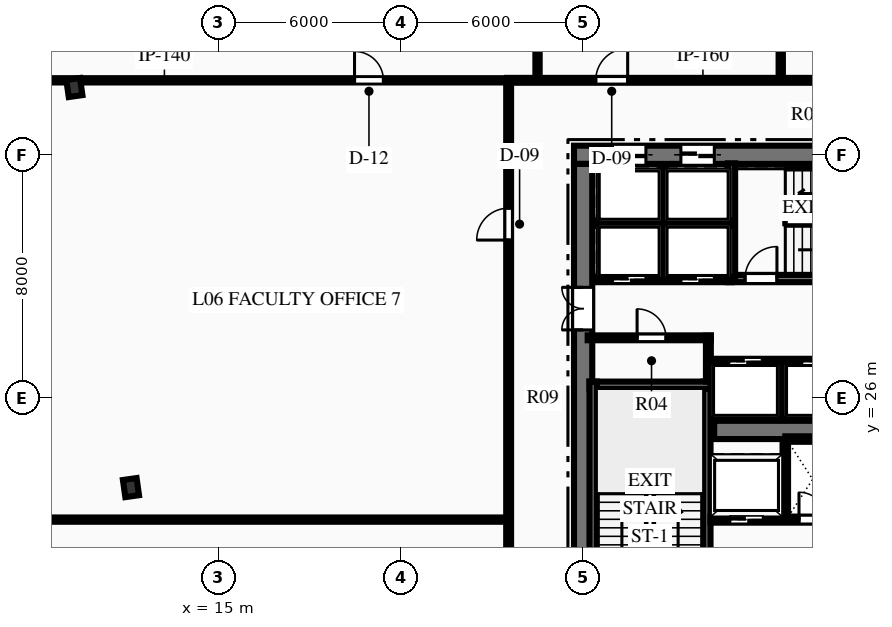
"""IFC4 building model, lengths in metres.
Left out: names, types, materials, properties, quantities, classifications, styles, units other than length and angle.
Written with IfcOpenShell. Run it as: python <this file> out.ifc"""

import sys

from ifc_helpers import new_model, si_unit, direction, frame, frame_2d, origin, origin_2d, place, context, subcontext, project, spatial, rectangle, i_section, extrude, element, fill, save


model = new_model("IFC4")
c1 = context("Model", 3, precision=1e-05, world=origin(), true_north=direction((0.0, 1.0)))
c2 = subcontext(c1, "Body", "Model", "MODEL_VIEW")
j1 = project(units=[si_unit("LENGTHUNIT", "METRE"), si_unit("PLANEANGLEUNIT", "RADIAN")], contexts=[c1])
p1 = place(None, origin())
s1 = spatial("IfcSite", under=j1, at=p1, CompositionType="ELEMENT")
p2 = place(p1, origin())
s2 = spatial("IfcBuilding", under=s1, at=p2, CompositionType="ELEMENT")
p3 = place(p2, frame((0.0, 0.0, 32.7)))
s3 = spatial("IfcBuildingStorey", under=s2, at=p3, CompositionType="ELEMENT", Elevation=32.7)
p4 = place(p3, frame((26.7, 34.0, 0.0), z_axis=(0.0, 0.0, 1.0), x_axis=(1.0, 0.0, 0.0)))
e1 = element("IfcWall", 1, at=p4, inside=s3, PredefinedType="SHEAR", context=c2, shape_type="SweptSolid", body=[
    extrude(rectangle(XDim=18.6, YDim=0.6, at=frame_2d((9.3, 0.0))), origin(), (0.0, 0.0, 1.0), 3.75),
])
p5 = place(p4, frame((1.265, 0.0, 0.0)))
e2 = element("IfcOpeningElement", 2, at=p5, cuts=e1, PredefinedType="OPENING", context=c2, shape_type="SweptSolid", body=[
    extrude(rectangle(XDim=1.1, YDim=2.15, at=frame_2d((0.55, 1.075))), frame((0.0, 0.31, 0.0), z_axis=(0.0, -1.0, 0.0), x_axis=(1.0, 0.0, 0.0)), (0.0, 0.0, 1.0), 0.62),
])
p6 = place(p4, frame((3.515, 0.0, 0.0)))
e3 = element("IfcOpeningElement", 3, at=p6, cuts=e1, PredefinedType="OPENING", context=c2, shape_type="SweptSolid", body=[
    extrude(rectangle(XDim=1.1, YDim=2.15, at=frame_2d((0.55, 1.075))), frame((0.0, 0.31, 0.0), z_axis=(0.0, -1.0, 0.0), x_axis=(1.0, 0.0, 0.0)), (0.0, 0.0, 1.0), 0.62),
])
p7 = place(p4, frame((13.985, 0.0, 0.0)))
e4 = element("IfcOpeningElement", 4, at=p7, cuts=e1, PredefinedType="OPENING", context=c2, shape_type="SweptSolid", body=[
    extrude(rectangle(XDim=1.1, YDim=2.15, at=frame_2d((0.55, 1.075))), frame((0.0, 0.31, 0.0), z_axis=(0.0, -1.0, 0.0), x_axis=(1.0, 0.0, 0.0)), (0.0, 0.0, 1.0), 0.62),
])
p8 = place(p4, frame((16.235, 0.0, 0.0)))
e5 = element("IfcOpeningElement", 5, at=p8, cuts=e1, PredefinedType="OPENING", context=c2, shape_type="SweptSolid", body=[
    extrude(rectangle(XDim=1.1, YDim=2.15, at=frame_2d((0.55, 1.075))), frame((0.0, 0.31, 0.0), z_axis=(0.0, -1.0, 0.0), x_axis=(1.0, 0.0, 0.0)), (0.0, 0.0, 1.0), 0.62),
])
p9 = place(p3, frame((27.0, 18.3, 0.0), z_axis=(0.0, 0.0, 1.0), x_axis=(0.0, 1.0, 0.0)))
e6 = element("IfcWall", 6, at=p9, inside=s3, PredefinedType="SHEAR", context=c2, shape_type="SweptSolid", body=[
    extrude(rectangle(XDim=15.4, YDim=0.6, at=frame_2d((7.7, 0.0))), origin(), (0.0, 0.0, 1.0), 3.75),
])
p10 = place(p9, frame((9.94, 0.0, 0.0)))
e7 = element("IfcOpeningElement", 7, at=p10, cuts=e6, PredefinedType="OPENING", context=c2, shape_type="SweptSolid", body=[
    extrude(rectangle(XDim=1.4, YDim=2.2, at=frame_2d((0.7, 1.1))), frame((0.0, 0.31, 0.0), z_axis=(0.0, -1.0, 0.0), x_axis=(1.0, 0.0, 0.0)), (0.0, 0.0, 1.0), 0.62),
])
p11 = place(p3, frame((31.31, 24.95, 0.0), z_axis=(0.0, 0.0, 1.0), x_axis=(1.0, 0.0, 0.0)))
e8 = element("IfcWall", 8, at=p11, inside=s3, PredefinedType="SHEAR", context=c2, shape_type="SweptSolid", body=[
    extrude(rectangle(XDim=9.38, YDim=0.6, at=frame_2d((4.69, 0.0))), origin(), (0.0, 0.0, 1.0), 3.75),
])
p12 = place(p3, frame((31.07, 18.28, 0.0), z_axis=(0.0, 0.0, 1.0), x_axis=(0.0, 1.0, 0.0)))
e9 = element("IfcWall", 9, at=p12, inside=s3, PredefinedType="SHEAR", context=c2, shape_type="SweptSolid", body=[
    extrude(rectangle(XDim=8.26, YDim=0.24, at=frame_2d((4.13, 0.0))), origin(), (0.0, 0.0, 1.0), 3.75),
])
p13 = place(p12, frame((0.365, 0.0, 0.0)))
e10 = element("IfcOpeningElement", 10, at=p13, cuts=e9, PredefinedType="OPENING", context=c2, shape_type="SweptSolid", body=[
    extrude(rectangle(XDim=1.05, YDim=2.15, at=frame_2d((0.525, 1.075))), frame((0.0, 0.13, 0.0), z_axis=(0.0, -1.0, 0.0), x_axis=(1.0, 0.0, 0.0)), (0.0, 0.0, 1.0), 0.26),
])
p14 = place(p3, frame((27.21, 26.42, 0.0), z_axis=(0.0, 0.0, 1.0), x_axis=(1.0, 0.0, 0.0)))
e11 = element("IfcWall", 11, at=p14, inside=s3, PredefinedType="SHEAR", context=c2, shape_type="SweptSolid", body=[
    extrude(rectangle(XDim=3.98, YDim=0.24, at=frame_2d((1.99, 0.0))), origin(), (0.0, 0.0, 1.0), 3.75),
])
p15 = place(p3, frame((27.33, 18.28, 0.0), z_axis=(0.0, 0.0, 1.0), x_axis=(0.0, 1.0, 0.0)))
e12 = element("IfcWall", 12, at=p15, inside=s3, PredefinedType="SHEAR", context=c2, shape_type="SweptSolid", body=[
    extrude(rectangle(XDim=8.26, YDim=0.24, at=frame_2d((4.13, 0.0))), origin(), (0.0, 0.0, 1.0), 3.75),
])
p16 = place(p3, frame((31.76, 29.93, 0.0), z_axis=(0.0, 0.0, 1.0), x_axis=(1.0, 0.0, 0.0)))
e13 = element("IfcWall", 13, at=p16, inside=s3, PredefinedType="SHEAR", context=c2, shape_type="SweptSolid", body=[
    extrude(rectangle(XDim=8.38, YDim=0.24, at=frame_2d((4.19, 0.0))), origin(), (0.0, 0.0, 1.0), 3.75),
])
p17 = place(p16, frame((0.565, 0.0, 0.0)))
e14 = element("IfcOpeningElement", 14, at=p17, cuts=e13, PredefinedType="OPENING", context=c2, shape_type="SweptSolid", body=[
    extrude(rectangle(XDim=1.05, YDim=2.15, at=frame_2d((0.525, 1.075))), frame((0.0, 0.13, 0.0), z_axis=(0.0, -1.0, 0.0), x_axis=(1.0, 0.0, 0.0)), (0.0, 0.0, 1.0), 0.26),
])
p18 = place(p3, frame((31.88, 29.93, 0.0), z_axis=(0.0, 0.0, 1.0), x_axis=(0.0, 1.0, 0.0)))
e15 = element("IfcWall", 15, at=p18, inside=s3, PredefinedType="SHEAR", context=c2, shape_type="SweptSolid", body=[
    extrude(rectangle(XDim=3.79, YDim=0.24, at=frame_2d((1.895, 0.0))), origin(), (0.0, 0.0, 1.0), 3.75),
])
for number, where, z_axis, x_axis in (
    (16, (10.266, 36.213, 0.0), (0.0, 0.0, 1.0), (0.99, 0.14, 0.0)),
    (17, (12.127, 23.053, 0.0), (0.0, 0.0, 1.0), (0.99, 0.14, 0.0)),
):
    element("IfcColumn", number, at=place(p3, frame(where, z_axis=z_axis, x_axis=x_axis)), inside=s3, PredefinedType="COLUMN", context=c2, shape_type="SweptSolid", body=[
        extrude(i_section(OverallWidth=0.454, OverallDepth=0.569, WebThickness=0.078, FlangeThickness=0.125, at=origin_2d()), origin(), (0.0, 0.0, 1.0), 3.75),
    ])
p19 = place(p3, frame((31.19, 22.0, 0.0), z_axis=(0.0, 0.0, 1.0), x_axis=(1.0, 0.0, 0.0)))
e18 = element("IfcWall", 18, at=p19, inside=s3, PredefinedType="PARTITIONING", context=c2, shape_type="SweptSolid", body=[
    extrude(rectangle(XDim=4.69, YDim=0.2, at=frame_2d((2.345, 0.0))), origin(), (0.0, 0.0, 1.0), 3.44),
])
p20 = place(p19, frame((2.91, 0.0, 0.0)))
e19 = element("IfcOpeningElement", 19, at=p20, cuts=e18, PredefinedType="OPENING", context=c2, shape_type="SweptSolid", body=[
    extrude(rectangle(XDim=0.9, YDim=2.15, at=frame_2d((0.45, 1.075))), frame((0.0, 0.11, 0.0), z_axis=(0.0, -1.0, 0.0), x_axis=(1.0, 0.0, 0.0)), (0.0, 0.0, 1.0), 0.22),
])
p21 = place(p19, frame((0.635, 0.0, 0.0)))
e20 = element("IfcOpeningElement", 20, at=p21, cuts=e18, PredefinedType="OPENING", context=c2, shape_type="SweptSolid", body=[
    extrude(rectangle(XDim=1.1, YDim=2.15, at=frame_2d((0.55, 1.075))), frame((0.0, 0.11, 0.0), z_axis=(0.0, -1.0, 0.0), x_axis=(1.0, 0.0, 0.0)), (0.0, 0.0, 1.0), 0.22),
])
p22 = place(p3, frame((33.65, 22.05, 0.0), z_axis=(0.0, 0.0, 1.0), x_axis=(0.0, 1.0, 0.0)))
e21 = element("IfcWall", 21, at=p22, inside=s3, PredefinedType="PARTITIONING", context=c2, shape_type="SweptSolid", body=[
    extrude(rectangle(XDim=2.6, YDim=0.18, at=frame_2d((1.3, 0.0))), origin(), (0.0, 0.0, 1.0), 3.44),
])
p23 = place(p3, frame((33.65, 24.65, 0.0), z_axis=(0.0, 0.0, 1.0), x_axis=(1.0, 0.0, 0.0)))
e22 = element("IfcWall", 22, at=p23, inside=s3, PredefinedType="PARTITIONING", context=c2, shape_type="SweptSolid", body=[
    extrude(rectangle(XDim=1.8, YDim=0.18, at=frame_2d((0.9, 0.0))), origin(), (0.0, 0.0, 1.0), 3.44),
])
p24 = place(p3, frame((27.15, 27.98, 0.0), z_axis=(0.0, 0.0, 1.0), x_axis=(1.0, 0.0, 0.0)))
e23 = element("IfcWall", 23, at=p24, inside=s3, PredefinedType="PARTITIONING", context=c2, shape_type="SweptSolid", body=[
    extrude(rectangle(XDim=4.05, YDim=0.16, at=frame_2d((2.025, 0.0))), origin(), (0.0, 0.0, 1.0), 3.44),
])
p25 = place(p24, frame((1.625, 0.0, 0.0)))
e24 = element("IfcOpeningElement", 24, at=p25, cuts=e23, PredefinedType="OPENING", context=c2, shape_type="SweptSolid", body=[
    extrude(rectangle(XDim=0.95, YDim=2.15, at=frame_2d((0.475, 1.075))), frame((0.0, 0.09, 0.0), z_axis=(0.0, -1.0, 0.0), x_axis=(1.0, 0.0, 0.0)), (0.0, 0.0, 1.0), 0.18),
])
p26 = place(p3, frame((31.12, 26.54, 0.0), z_axis=(0.0, 0.0, 1.0), x_axis=(0.0, 1.0, 0.0)))
e25 = element("IfcWall", 25, at=p26, inside=s3, PredefinedType="PARTITIONING", context=c2, shape_type="SweptSolid", body=[
    extrude(rectangle(XDim=1.51, YDim=0.16, at=frame_2d((0.755, 0.0))), origin(), (0.0, 0.0, 1.0), 3.44),
])
p27 = place(p3, frame((27.45, 29.9, 0.0), z_axis=(0.0, 0.0, 1.0), x_axis=(1.0, 0.0, 0.0)))
e26 = element("IfcWall", 26, at=p27, inside=s3, PredefinedType="PARTITIONING", context=c2, shape_type="SweptSolid", body=[
    extrude(rectangle(XDim=4.43, YDim=0.18, at=frame_2d((2.215, 0.0))), origin(), (0.0, 0.0, 1.0), 3.44),
])
p28 = place(p27, frame((0.515, 0.0, 0.0)))
e27 = element("IfcOpeningElement", 27, at=p28, cuts=e26, PredefinedType="OPENING", context=c2, shape_type="SweptSolid", body=[
    extrude(rectangle(XDim=1.1, YDim=2.15, at=frame_2d((0.55, 1.075))), frame((0.0, 0.1, 0.0), z_axis=(0.0, -1.0, 0.0), x_axis=(1.0, 0.0, 0.0)), (0.0, 0.0, 1.0), 0.2),
])
p29 = place(p27, frame((2.765, 0.0, 0.0)))
e28 = element("IfcOpeningElement", 28, at=p29, cuts=e26, PredefinedType="OPENING", context=c2, shape_type="SweptSolid", body=[
    extrude(rectangle(XDim=1.1, YDim=2.15, at=frame_2d((0.55, 1.075))), frame((0.0, 0.1, 0.0), z_axis=(0.0, -1.0, 0.0), x_axis=(1.0, 0.0, 0.0)), (0.0, 0.0, 1.0), 0.2),
])
p30 = place(p3, frame((27.45, 31.75, 0.0), z_axis=(0.0, 0.0, 1.0), x_axis=(1.0, 0.0, 0.0)))
e29 = element("IfcWall", 29, at=p30, inside=s3, PredefinedType="PARTITIONING", context=c2, shape_type="SweptSolid", body=[
    extrude(rectangle(XDim=4.43, YDim=0.18, at=frame_2d((2.215, 0.0))), origin(), (0.0, 0.0, 1.0), 3.44),
])
p31 = place(p3, frame((29.63, 29.9, 0.0), z_axis=(0.0, 0.0, 1.0), x_axis=(0.0, 1.0, 0.0)))
e30 = element("IfcWall", 30, at=p31, inside=s3, PredefinedType="PARTITIONING", context=c2, shape_type="SweptSolid", body=[
    extrude(rectangle(XDim=3.75, YDim=0.18, at=frame_2d((1.875, 0.0))), origin(), (0.0, 0.0, 1.0), 3.44),
])
p32 = place(p3, frame((31.2, 27.2, 0.0), z_axis=(0.0, 0.0, 1.0), x_axis=(1.0, 0.0, 0.0)))
e31 = element("IfcWall", 31, at=p32, inside=s3, PredefinedType="PARTITIONING", context=c2, shape_type="SweptSolid", body=[
    extrude(rectangle(XDim=9.6, YDim=0.18, at=frame_2d((4.8, 0.0))), origin(), (0.0, 0.0, 1.0), 3.44),
])
p33 = place(p32, frame((0.59, 0.0, 0.0)))
e32 = element("IfcOpeningElement", 32, at=p33, cuts=e31, PredefinedType="OPENING", context=c2, shape_type="SweptSolid", body=[
    extrude(rectangle(XDim=1.1, YDim=2.15, at=frame_2d((0.55, 1.075))), frame((0.0, 0.1, 0.0), z_axis=(0.0, -1.0, 0.0), x_axis=(1.0, 0.0, 0.0)), (0.0, 0.0, 1.0), 0.2),
])
p34 = place(p32, frame((2.99, 0.0, 0.0)))
e33 = element("IfcOpeningElement", 33, at=p34, cuts=e31, PredefinedType="OPENING", context=c2, shape_type="SweptSolid", body=[
    extrude(rectangle(XDim=1.1, YDim=2.15, at=frame_2d((0.55, 1.075))), frame((0.0, 0.1, 0.0), z_axis=(0.0, -1.0, 0.0), x_axis=(1.0, 0.0, 0.0)), (0.0, 0.0, 1.0), 0.2),
])
p35 = place(p32, frame((5.51, 0.0, 0.0)))
e34 = element("IfcOpeningElement", 34, at=p35, cuts=e31, PredefinedType="OPENING", context=c2, shape_type="SweptSolid", body=[
    extrude(rectangle(XDim=1.1, YDim=2.15, at=frame_2d((0.55, 1.075))), frame((0.0, 0.1, 0.0), z_axis=(0.0, -1.0, 0.0), x_axis=(1.0, 0.0, 0.0)), (0.0, 0.0, 1.0), 0.2),
])
p36 = place(p32, frame((7.91, 0.0, 0.0)))
e35 = element("IfcOpeningElement", 35, at=p36, cuts=e31, PredefinedType="OPENING", context=c2, shape_type="SweptSolid", body=[
    extrude(rectangle(XDim=1.1, YDim=2.15, at=frame_2d((0.55, 1.075))), frame((0.0, 0.1, 0.0), z_axis=(0.0, -1.0, 0.0), x_axis=(1.0, 0.0, 0.0)), (0.0, 0.0, 1.0), 0.2),
])
p37 = place(p3, frame((33.54, 25.3, 0.0), z_axis=(0.0, 0.0, 1.0), x_axis=(0.0, 1.0, 0.0)))
e36 = element("IfcWall", 36, at=p37, inside=s3, PredefinedType="PARTITIONING", context=c2, shape_type="SweptSolid", body=[
    extrude(rectangle(XDim=1.9, YDim=0.18, at=frame_2d((0.95, 0.0))), origin(), (0.0, 0.0, 1.0), 3.44),
])
p38 = place(p3, frame((24.5, 36.45, 0.0), z_axis=(0.0, 0.0, 1.0), x_axis=(1.0, 0.0, 0.0)))
e37 = element("IfcWall", 37, at=p38, inside=s3, PredefinedType="PARTITIONING", context=c2, shape_type="SweptSolid", body=[
    extrude(rectangle(XDim=23.0, YDim=0.16, at=frame_2d((11.5, 0.0))), origin(), (0.0, 0.0, 1.0), 3.44),
])
p39 = place(p38, frame((13.75, 0.0, 0.0)))
e38 = element("IfcOpeningElement", 38, at=p39, cuts=e37, PredefinedType="OPENING", context=c2, shape_type="SweptSolid", body=[
    extrude(rectangle(XDim=0.9, YDim=2.15, at=frame_2d((0.45, 1.075))), frame((0.0, 0.09, 0.0), z_axis=(0.0, -1.0, 0.0), x_axis=(1.0, 0.0, 0.0)), (0.0, 0.0, 1.0), 0.18),
])
p40 = place(p38, frame((16.05, 0.0, 0.0)))
e39 = element("IfcOpeningElement", 39, at=p40, cuts=e37, PredefinedType="OPENING", context=c2, shape_type="SweptSolid", body=[
    extrude(rectangle(XDim=0.9, YDim=2.15, at=frame_2d((0.45, 1.075))), frame((0.0, 0.09, 0.0), z_axis=(0.0, -1.0, 0.0), x_axis=(1.0, 0.0, 0.0)), (0.0, 0.0, 1.0), 0.18),
])
p41 = place(p38, frame((18.3, 0.0, 0.0)))
e40 = element("IfcOpeningElement", 40, at=p41, cuts=e37, PredefinedType="OPENING", context=c2, shape_type="SweptSolid", body=[
    extrude(rectangle(XDim=1.0, YDim=2.15, at=frame_2d((0.5, 1.075))), frame((0.0, 0.09, 0.0), z_axis=(0.0, -1.0, 0.0), x_axis=(1.0, 0.0, 0.0)), (0.0, 0.0, 1.0), 0.18),
])
p42 = place(p38, frame((2.915, 0.0, 0.0)))
e41 = element("IfcOpeningElement", 41, at=p42, cuts=e37, PredefinedType="OPENING", context=c2, shape_type="SweptSolid", body=[
    extrude(rectangle(XDim=1.05, YDim=2.15, at=frame_2d((0.525, 1.075))), frame((0.0, 0.09, 0.0), z_axis=(0.0, -1.0, 0.0), x_axis=(1.0, 0.0, 0.0)), (0.0, 0.0, 1.0), 0.18),
])
p43 = place(p38, frame((11.335, 0.0, 0.0)))
e42 = element("IfcOpeningElement", 42, at=p43, cuts=e37, PredefinedType="OPENING", context=c2, shape_type="SweptSolid", body=[
    extrude(rectangle(XDim=1.05, YDim=2.15, at=frame_2d((0.525, 1.075))), frame((0.0, 0.09, 0.0), z_axis=(0.0, -1.0, 0.0), x_axis=(1.0, 0.0, 0.0)), (0.0, 0.0, 1.0), 0.18),
])
p44 = place(p3, frame((24.55, 15.55, 0.0), z_axis=(0.0, 0.0, 1.0), x_axis=(0.0, 1.0, 0.0)))
e43 = element("IfcWall", 43, at=p44, inside=s3, PredefinedType="PARTITIONING", context=c2, shape_type="SweptSolid", body=[
    extrude(rectangle(XDim=20.9, YDim=0.16, at=frame_2d((10.45, 0.0))), origin(), (0.0, 0.0, 1.0), 3.44),
])
p45 = place(p44, frame((2.052, 0.0, 0.0)))
e44 = element("IfcOpeningElement", 44, at=p45, cuts=e43, PredefinedType="OPENING", context=c2, shape_type="SweptSolid", body=[
    extrude(rectangle(XDim=1.05, YDim=2.15, at=frame_2d((0.525, 1.075))), frame((0.0, 0.09, 0.0), z_axis=(0.0, -1.0, 0.0), x_axis=(1.0, 0.0, 0.0)), (0.0, 0.0, 1.0), 0.18),
])
p46 = place(p44, frame((15.645, 0.0, 0.0)))
e45 = element("IfcOpeningElement", 45, at=p46, cuts=e43, PredefinedType="OPENING", context=c2, shape_type="SweptSolid", body=[
    extrude(rectangle(XDim=1.05, YDim=2.15, at=frame_2d((0.525, 1.075))), frame((0.0, 0.09, 0.0), z_axis=(0.0, -1.0, 0.0), x_axis=(1.0, 0.0, 0.0)), (0.0, 0.0, 1.0), 0.18),
])
p47 = place(p3, frame((8.825, 36.45, 0.0), z_axis=(0.0, 0.0, 1.0), x_axis=(1.0, 0.0, 0.0)))
e46 = element("IfcWall", 46, at=p47, inside=s3, PredefinedType="PARTITIONING", context=c2, shape_type="SweptSolid", body=[
    extrude(rectangle(XDim=15.725, YDim=0.14, at=frame_2d((7.863, 0.0))), origin(), (0.0, 0.0, 1.0), 2.739),
])
p48 = place(p47, frame((10.656, 0.0, 0.0)))
e47 = element("IfcOpeningElement", 47, at=p48, cuts=e46, PredefinedType="OPENING", context=c2, shape_type="SweptSolid", body=[
    extrude(rectangle(XDim=0.95, YDim=2.15, at=frame_2d((0.475, 1.075))), frame((0.0, 0.08, 0.0), z_axis=(0.0, -1.0, 0.0), x_axis=(1.0, 0.0, 0.0)), (0.0, 0.0, 1.0), 0.16),
])
p49 = place(p3, frame((25.5, 36.45, 0.0), z_axis=(0.0, 0.0, 1.0), x_axis=(0.0, 1.0, 0.0)))
e48 = element("IfcWall", 48, at=p49, inside=s3, PredefinedType="PARTITIONING", context=c2, shape_type="SweptSolid", body=[
    extrude(rectangle(XDim=15.304, YDim=0.14, at=frame_2d((7.652, 0.0))), origin(), (0.0, 0.0, 1.0), 3.44),
])
p50 = place(p3, frame((33.5, 36.45, 0.0), z_axis=(0.0, 0.0, 1.0), x_axis=(0.0, 1.0, 0.0)))
e49 = element("IfcWall", 49, at=p50, inside=s3, PredefinedType="PARTITIONING", context=c2, shape_type="SweptSolid", body=[
    extrude(rectangle(XDim=15.465, YDim=0.14, at=frame_2d((7.732, 0.0))), origin(), (0.0, 0.0, 1.0), 3.44),
])
p51 = place(p3, frame((9.115, 22.0, 0.0), z_axis=(0.0, 0.0, 1.0), x_axis=(1.0, 0.0, 0.0)))
e50 = element("IfcWall", 50, at=p51, inside=s3, PredefinedType="PARTITIONING", context=c2, shape_type="SweptSolid", body=[
    extrude(rectangle(XDim=15.435, YDim=0.14, at=frame_2d((7.718, 0.0))), origin(), (0.0, 0.0, 1.0), 3.44),
])
p52 = place(p25, origin())
e51 = element("IfcDoor", 51, at=p52, inside=s3, OperationType="SINGLE_SWING_LEFT", PredefinedType="DOOR", context=c2, shape_type="SweptSolid", body=[
    extrude(rectangle(XDim=0.95, YDim=2.15, at=frame_2d((0.475, 1.075))), frame((0.0, 0.025, 0.0), z_axis=(0.0, -1.0, 0.0), x_axis=(1.0, 0.0, 0.0)), (0.0, 0.0, 1.0), 0.05),
])
fill(e24, e51)
p53 = place(p17, origin())
e52 = element("IfcDoor", 52, at=p53, inside=s3, OperationType="SINGLE_SWING_RIGHT", PredefinedType="DOOR", context=c2, shape_type="SweptSolid", body=[
    extrude(rectangle(XDim=1.05, YDim=2.15, at=frame_2d((0.525, 1.075))), frame((0.0, 0.025, 0.0), z_axis=(0.0, -1.0, 0.0), x_axis=(1.0, 0.0, 0.0)), (0.0, 0.0, 1.0), 0.05),
])
fill(e14, e52)
p54 = place(p20, origin())
e53 = element("IfcDoor", 53, at=p54, inside=s3, OperationType="SINGLE_SWING_LEFT", PredefinedType="DOOR", context=c2, shape_type="SweptSolid", body=[
    extrude(rectangle(XDim=0.9, YDim=2.15, at=frame_2d((0.45, 1.075))), frame((0.0, 0.025, 0.0), z_axis=(0.0, -1.0, 0.0), x_axis=(1.0, 0.0, 0.0)), (0.0, 0.0, 1.0), 0.05),
])
fill(e19, e53)
p55 = place(p10, origin())
e54 = element("IfcDoor", 54, at=p55, inside=s3, OperationType="DOUBLE_DOOR_SINGLE_SWING", PredefinedType="DOOR", context=c2, shape_type="SweptSolid", body=[
    extrude(rectangle(XDim=1.4, YDim=2.2, at=frame_2d((0.7, 1.1))), frame((0.0, 0.025, 0.0), z_axis=(0.0, -1.0, 0.0), x_axis=(1.0, 0.0, 0.0)), (0.0, 0.0, 1.0), 0.05),
])
fill(e7, e54)
p56 = place(p48, origin())
e55 = element("IfcDoor", 55, at=p56, inside=s3, OperationType="SINGLE_SWING_LEFT", PredefinedType="DOOR", context=c2, shape_type="SweptSolid", body=[
    extrude(rectangle(XDim=0.95, YDim=2.15, at=frame_2d((0.475, 1.075))), frame((0.0, 0.025, 0.0), z_axis=(0.0, -1.0, 0.0), x_axis=(1.0, 0.0, 0.0)), (0.0, 0.0, 1.0), 0.05),
])
fill(e47, e55)
p57 = place(p42, origin())
e56 = element("IfcDoor", 56, at=p57, inside=s3, OperationType="SINGLE_SWING_RIGHT", PredefinedType="DOOR", context=c2, shape_type="SweptSolid", body=[
    extrude(rectangle(XDim=1.05, YDim=2.15, at=frame_2d((0.525, 1.075))), frame((0.0, 0.025, 0.0), z_axis=(0.0, -1.0, 0.0), x_axis=(1.0, 0.0, 0.0)), (0.0, 0.0, 1.0), 0.05),
])
fill(e41, e56)
p58 = place(p46, origin())
e57 = element("IfcDoor", 57, at=p58, inside=s3, OperationType="SINGLE_SWING_LEFT", PredefinedType="DOOR", context=c2, shape_type="SweptSolid", body=[
    extrude(rectangle(XDim=1.05, YDim=2.15, at=frame_2d((0.525, 1.075))), frame((0.0, 0.025, 0.0), z_axis=(0.0, -1.0, 0.0), x_axis=(1.0, 0.0, 0.0)), (0.0, 0.0, 1.0), 0.05),
])
fill(e45, e57)
p59 = place(p28, origin())
e58 = element("IfcDoor", 58, at=p59, inside=s3, OperationType="SLIDING_TO_LEFT", PredefinedType="DOOR", context=c2, shape_type="SweptSolid", body=[
    extrude(rectangle(XDim=1.1, YDim=2.15, at=frame_2d((0.55, 1.075))), frame((0.0, 0.025, 0.0), z_axis=(0.0, -1.0, 0.0), x_axis=(1.0, 0.0, 0.0)), (0.0, 0.0, 1.0), 0.05),
])
fill(e27, e58)
p60 = place(p29, origin())
e59 = element("IfcDoor", 59, at=p60, inside=s3, OperationType="SLIDING_TO_LEFT", PredefinedType="DOOR", context=c2, shape_type="SweptSolid", body=[
    extrude(rectangle(XDim=1.1, YDim=2.15, at=frame_2d((0.55, 1.075))), frame((0.0, 0.025, 0.0), z_axis=(0.0, -1.0, 0.0), x_axis=(1.0, 0.0, 0.0)), (0.0, 0.0, 1.0), 0.05),
])
fill(e28, e59)
p61 = place(p5, origin())
e60 = element("IfcDoor", 60, at=p61, inside=s3, OperationType="SLIDING_TO_LEFT", PredefinedType="DOOR", context=c2, shape_type="SweptSolid", body=[
    extrude(rectangle(XDim=1.1, YDim=2.15, at=frame_2d((0.55, 1.075))), frame((0.0, 0.025, 0.0), z_axis=(0.0, -1.0, 0.0), x_axis=(1.0, 0.0, 0.0)), (0.0, 0.0, 1.0), 0.05),
])
fill(e2, e60)
p62 = place(p6, origin())
e61 = element("IfcDoor", 61, at=p62, inside=s3, OperationType="SLIDING_TO_LEFT", PredefinedType="DOOR", context=c2, shape_type="SweptSolid", body=[
    extrude(rectangle(XDim=1.1, YDim=2.15, at=frame_2d((0.55, 1.075))), frame((0.0, 0.025, 0.0), z_axis=(0.0, -1.0, 0.0), x_axis=(1.0, 0.0, 0.0)), (0.0, 0.0, 1.0), 0.05),
])
fill(e3, e61)
p63 = place(p33, origin())
e62 = element("IfcDoor", 62, at=p63, inside=s3, OperationType="SLIDING_TO_LEFT", PredefinedType="DOOR", context=c2, shape_type="SweptSolid", body=[
    extrude(rectangle(XDim=1.1, YDim=2.15, at=frame_2d((0.55, 1.075))), frame((0.0, 0.025, 0.0), z_axis=(0.0, -1.0, 0.0), x_axis=(1.0, 0.0, 0.0)), (0.0, 0.0, 1.0), 0.05),
])
fill(e32, e62)
p64 = place(p34, origin())
e63 = element("IfcDoor", 63, at=p64, inside=s3, OperationType="SLIDING_TO_LEFT", PredefinedType="DOOR", context=c2, shape_type="SweptSolid", body=[
    extrude(rectangle(XDim=1.1, YDim=2.15, at=frame_2d((0.55, 1.075))), frame((0.0, 0.025, 0.0), z_axis=(0.0, -1.0, 0.0), x_axis=(1.0, 0.0, 0.0)), (0.0, 0.0, 1.0), 0.05),
])
fill(e33, e63)
p65 = place(p21, origin())
e64 = element("IfcDoor", 64, at=p65, inside=s3, OperationType="SLIDING_TO_LEFT", PredefinedType="DOOR", context=c2, shape_type="SweptSolid", body=[
    extrude(rectangle(XDim=1.1, YDim=2.15, at=frame_2d((0.55, 1.075))), frame((0.0, 0.025, 0.0), z_axis=(0.0, -1.0, 0.0), x_axis=(1.0, 0.0, 0.0)), (0.0, 0.0, 1.0), 0.05),
])
fill(e20, e64)
save(model, sys.argv[1])
